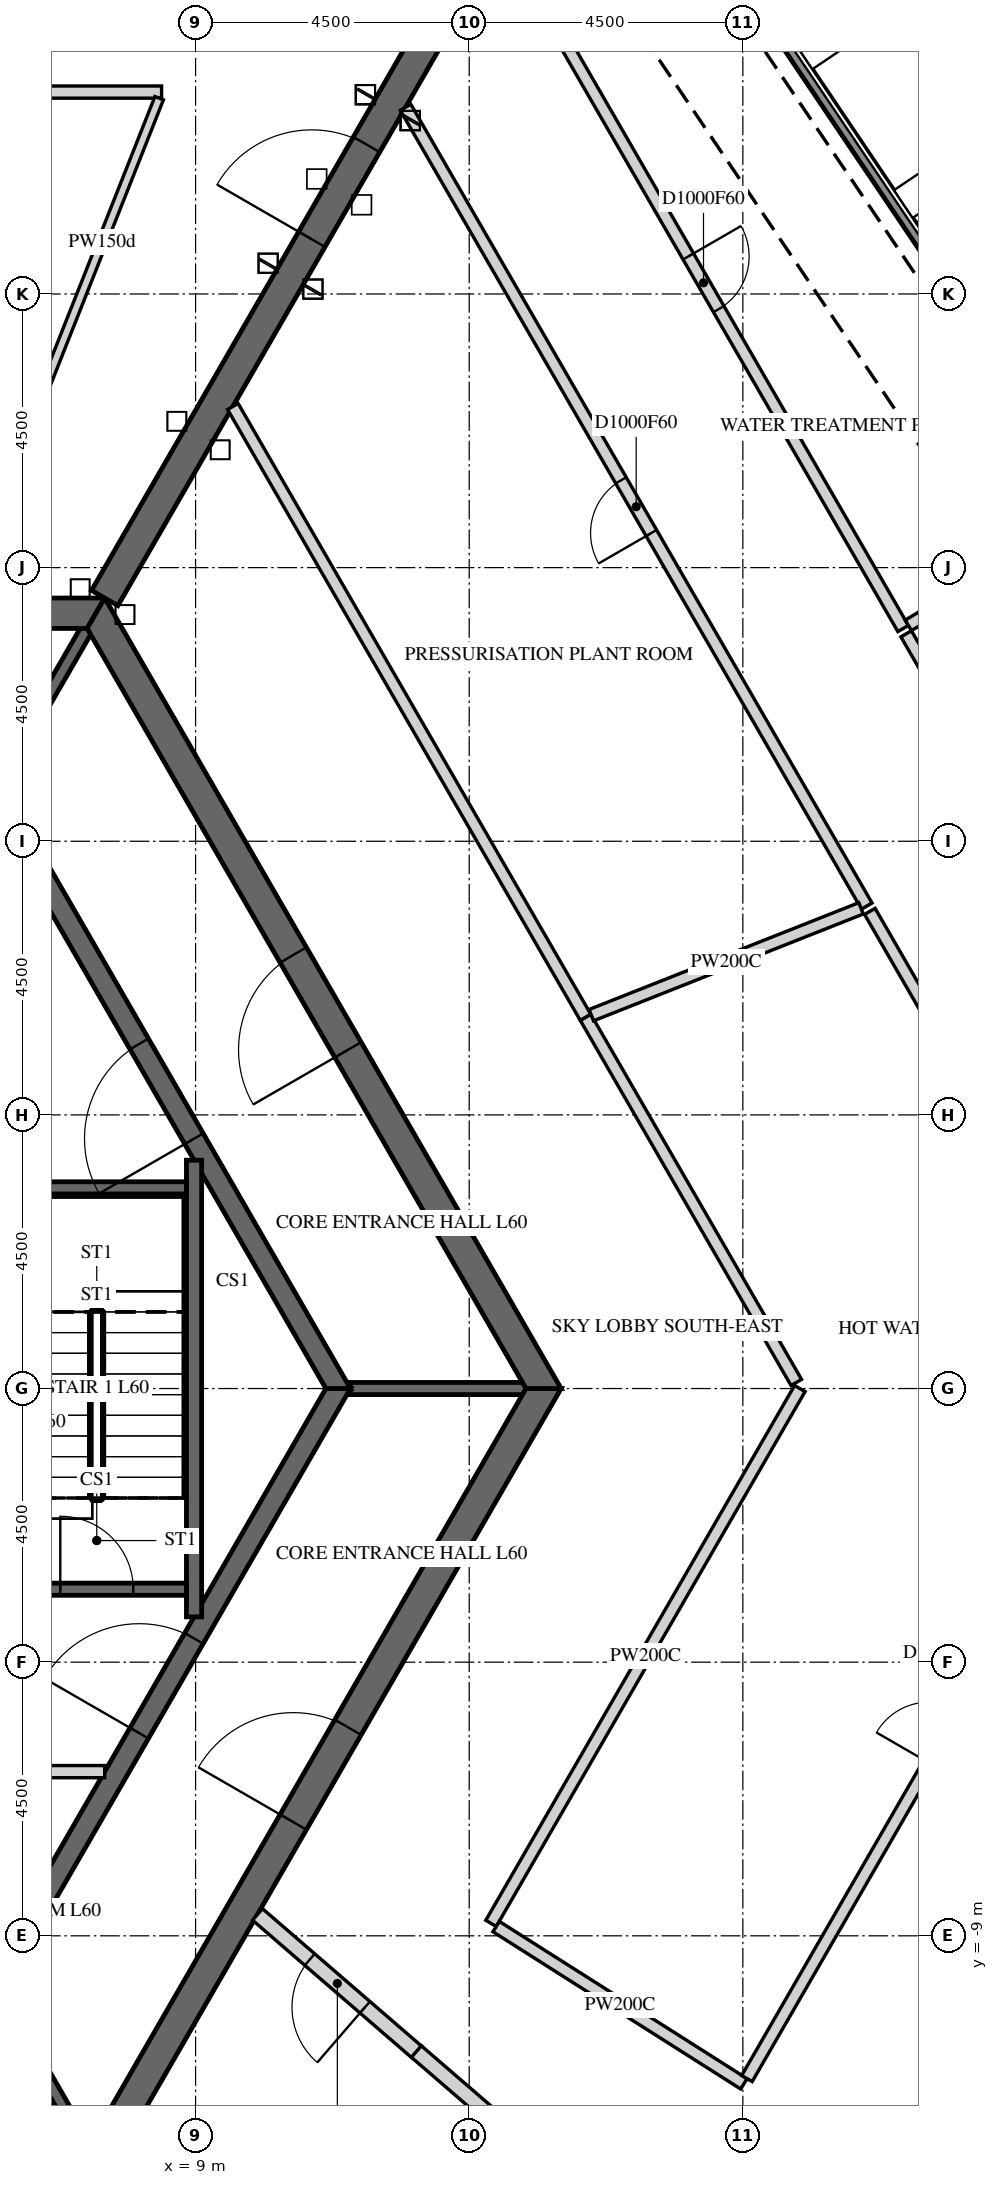
"""IFC4 building model, lengths in metres.
Left out: names, types, materials, properties, quantities, classifications, styles, units other than length and angle.
Written with IfcOpenShell. Run it as: python <this file> out.ifc"""

import sys

from ifc_helpers import new_model, si_unit, direction, frame, frame_2d, origin, place, context, subcontext, project, spatial, polyline, rectangle, outline, extrude, element, fill, save


model = new_model("IFC4")
c1 = context("Model", 3, precision=1e-05, world=origin(), true_north=direction((0.0, 1.0)))
c2 = subcontext(c1, "Body", "Model", "MODEL_VIEW")
j1 = project(units=[si_unit("LENGTHUNIT", "METRE"), si_unit("PLANEANGLEUNIT", "RADIAN")], contexts=[c1])
p1 = place(None, origin())
s1 = spatial("IfcSite", under=j1, at=p1, CompositionType="ELEMENT")
p2 = place(p1, origin())
s2 = spatial("IfcBuilding", under=s1, at=p2, CompositionType="ELEMENT")
p3 = place(p2, frame((0.0, 0.0, 250.2)))
s3 = spatial("IfcBuildingStorey", under=s2, at=p3, CompositionType="ELEMENT", Elevation=250.2)
p4 = place(p3, frame((15.999, 26.174, 5.7), z_axis=(0.0, 0.0, 1.0), x_axis=(0.559192735444, -0.82903768589, 0.0)))
e1 = element("IfcWall", 1, at=p4, inside=s3, PredefinedType="PARAPET", context=c2, shape_type="SweptSolid", body=[
    extrude(outline(polyline([(0.008, -0.1), (27.731, -0.1), (27.75, 0.1), (-0.008, 0.1), (0.008, -0.1)])), origin(), (0.0, 0.0, 1.0), 1.1),
])
p5 = place(p3, frame((31.656, -0.97, 5.7), z_axis=(0.0, 0.0, 1.0), x_axis=(-0.499997219864, -0.866027008891, 0.0)))
e2 = element("IfcWall", 2, at=p5, inside=s3, PredefinedType="PARAPET", context=c2, shape_type="SweptSolid", body=[
    extrude(outline(polyline([(0.009, -0.1), (27.732, -0.1), (27.749, 0.1), (-0.009, 0.1), (0.009, -0.1)])), origin(), (0.0, 0.0, 1.0), 1.1),
])
p6 = place(p3, frame((7.361, -12.75, -0.3), z_axis=(0.0, 0.0, 1.0), x_axis=(0.50000571537, 0.866022103989, 0.0)))
e3 = element("IfcWall", 3, at=p6, inside=s3, PredefinedType="SHEAR", context=c2, shape_type="SweptSolid", body=[
    extrude(outline(polyline([(-0.144, -0.25), (14.867, -0.25), (14.578, 0.25), (0.144, 0.25), (-0.144, -0.25)])), origin(), (0.0, 0.0, 1.0), 5.8),
])
p7 = place(p6, frame((6.49, 0.0, 0.3)))
e4 = element("IfcOpeningElement", 4, at=p7, cuts=e3, PredefinedType="OPENING", context=c2, shape_type="SweptSolid", body=[
    extrude(rectangle(XDim=1.8, YDim=2.4, at=frame_2d((0.9, 1.2))), frame((0.0, 0.26, 0.0), z_axis=(0.0, -1.0, 0.0), x_axis=(1.0, 0.0, 0.0)), (0.0, 0.0, 1.0), 0.52),
])
p8 = place(p3, frame((14.722, 0.0, -0.3), z_axis=(0.0, 0.0, 1.0), x_axis=(-0.50000571537, 0.866022103989, 0.0)))
e5 = element("IfcWall", 5, at=p8, inside=s3, PredefinedType="SHEAR", context=c2, shape_type="SweptSolid", body=[
    extrude(outline(polyline([(-0.144, -0.25), (14.867, -0.25), (14.578, 0.25), (0.144, 0.25), (-0.144, -0.25)])), origin(), (0.0, 0.0, 1.0), 5.8),
])
p9 = place(p8, frame((6.432, 0.0, 0.3)))
e6 = element("IfcOpeningElement", 6, at=p9, cuts=e5, PredefinedType="OPENING", context=c2, shape_type="SweptSolid", body=[
    extrude(rectangle(XDim=1.8, YDim=2.4, at=frame_2d((0.9, 1.2))), frame((0.0, 0.26, 0.0), z_axis=(0.0, -1.0, 0.0), x_axis=(1.0, 0.0, 0.0)), (0.0, 0.0, 1.0), 0.52),
])
p10 = place(p3, frame((7.361, 12.75, -0.3), z_axis=(0.0, 0.0, 1.0), x_axis=(-1.0, 0.0, 0.0)))
e7 = element("IfcWall", 7, at=p10, inside=s3, PredefinedType="SHEAR", context=c2, shape_type="SweptSolid", body=[
    extrude(outline(polyline([(-0.144, -0.25), (14.866, -0.25), (14.578, 0.25), (0.144, 0.25), (-0.144, -0.25)])), origin(), (0.0, 0.0, 1.0), 5.8),
])
p11 = place(p10, frame((6.761, 0.0, 0.3)))
e8 = element("IfcOpeningElement", 8, at=p11, cuts=e7, PredefinedType="OPENING", context=c2, shape_type="SweptSolid", body=[
    extrude(rectangle(XDim=1.2, YDim=2.4, at=frame_2d((0.6, 1.2))), frame((0.0, 0.26, 0.0), z_axis=(0.0, -1.0, 0.0), x_axis=(1.0, 0.0, 0.0)), (0.0, 0.0, 1.0), 0.52),
])
p12 = place(p3, frame((7.506, 13.0, -0.3), z_axis=(0.0, 0.0, 1.0), x_axis=(0.499988271576, 0.866032175087, 0.0)))
e9 = element("IfcWall", 9, at=p12, inside=s3, PredefinedType="SHEAR", context=c2, shape_type="SweptSolid", body=[
    extrude(rectangle(XDim=15.424, YDim=0.5, at=frame_2d((7.712, 0.0))), origin(), (0.0, 0.0, 1.0), 5.8),
])
p13 = place(p12, frame((6.812, 0.0, 0.3)))
e10 = element("IfcOpeningElement", 10, at=p13, cuts=e9, PredefinedType="OPENING", context=c2, shape_type="SweptSolid", body=[
    extrude(rectangle(XDim=1.8, YDim=2.4, at=frame_2d((0.9, 1.2))), frame((0.0, 0.26, 0.0), z_axis=(0.0, -1.0, 0.0), x_axis=(1.0, 0.0, 0.0)), (0.0, 0.0, 1.0), 0.52),
])
p14 = place(p3, frame((5.673, -9.825, -0.3), z_axis=(0.0, 0.0, 1.0), x_axis=(0.499995046907, 0.866028263435, 0.0)))
e11 = element("IfcWall", 11, at=p14, inside=s3, PredefinedType="SHEAR", context=c2, shape_type="SweptSolid", body=[
    extrude(outline(polyline([(-0.101, -0.175), (11.446, -0.175), (11.244, 0.175), (0.101, 0.175), (-0.101, -0.175)])), origin(), (0.0, 0.0, 1.0), 5.8),
])
p15 = place(p14, frame((4.801, 0.0, 0.3)))
e12 = element("IfcOpeningElement", 12, at=p15, cuts=e11, PredefinedType="OPENING", context=c2, shape_type="SweptSolid", body=[
    extrude(rectangle(XDim=1.8, YDim=2.4, at=frame_2d((0.9, 1.2))), frame((0.0, 0.185, 0.0), z_axis=(0.0, -1.0, 0.0), x_axis=(1.0, 0.0, 0.0)), (0.0, 0.0, 1.0), 0.37),
])
p16 = place(p3, frame((11.345, 0.0, -0.3), z_axis=(0.0, 0.0, 1.0), x_axis=(-0.499995046907, 0.866028263435, 0.0)))
e13 = element("IfcWall", 13, at=p16, inside=s3, PredefinedType="SHEAR", context=c2, shape_type="SweptSolid", body=[
    extrude(outline(polyline([(-0.101, -0.175), (11.446, -0.175), (11.244, 0.175), (0.101, 0.175), (-0.101, -0.175)])), origin(), (0.0, 0.0, 1.0), 5.8),
])
p17 = place(p16, frame((4.744, 0.0, 0.3)))
e14 = element("IfcOpeningElement", 14, at=p17, cuts=e13, PredefinedType="OPENING", context=c2, shape_type="SweptSolid", body=[
    extrude(rectangle(XDim=1.8, YDim=2.4, at=frame_2d((0.9, 1.2))), frame((0.0, 0.185, 0.0), z_axis=(0.0, -1.0, 0.0), x_axis=(1.0, 0.0, 0.0)), (0.0, 0.0, 1.0), 0.37),
])
p18 = place(p3, frame((3.7, -6.3, 0.0), z_axis=(0.0, 0.0, 1.0), x_axis=(1.0, 0.0, 0.0)))
e15 = element("IfcWall", 15, at=p18, inside=s3, PredefinedType="PARTITIONING", context=c2, shape_type="SweptSolid", body=[
    extrude(rectangle(XDim=3.806, YDim=0.2, at=frame_2d((1.903, 0.0))), origin(), (0.0, 0.0, 1.0), 5.5),
])
p19 = place(p18, frame((1.453, 0.0, 0.0)))
e16 = element("IfcOpeningElement", 16, at=p19, cuts=e15, PredefinedType="OPENING", context=c2, shape_type="SweptSolid", body=[
    extrude(rectangle(XDim=0.9, YDim=2.1, at=frame_2d((0.45, 1.05))), frame((0.0, 0.11, 0.0), z_axis=(0.0, -1.0, 0.0), x_axis=(1.0, 0.0, 0.0)), (0.0, 0.0, 1.0), 0.22),
])
for number, where, z_axis, x_axis in (
    (17, (11.547, 0.0, -0.3), (0.0, 0.0, 1.0), (1.0, 0.0, 0.0)),
    (18, (5.773, 10.0, -0.3), (0.0, 0.0, 1.0), (0.5, 0.866, 0.0)),
    (19, (5.773, -10.0, -0.3), (0.0, 0.0, 1.0), (0.5, -0.866, 0.0)),
):
    element("IfcWall", number, at=place(p3, frame(where, z_axis=z_axis, x_axis=x_axis)), inside=s3, PredefinedType="SHEAR", context=c2, shape_type="SweptSolid", body=[
        extrude(rectangle(XDim=2.887, YDim=0.2, at=frame_2d((1.443, 0.0))), origin(), (0.0, 0.0, 1.0), 5.8),
    ])
p20 = place(p3, frame((8.975, -3.755, -0.25), z_axis=(0.0, 0.0, 1.0), x_axis=(0.0, 1.0, 0.0)))
e20 = element("IfcWall", 20, at=p20, inside=s3, PredefinedType="SHEAR", context=c2, shape_type="SweptSolid", body=[
    extrude(rectangle(XDim=7.51, YDim=0.25, at=frame_2d((3.755, 0.0))), origin(), (0.0, 0.0, 1.0), 5.75),
])
p21 = place(p3, frame((5.9, 3.3, -0.25), z_axis=(0.0, 0.0, 1.0), x_axis=(1.0, 0.0, 0.0)))
e21 = element("IfcWall", 21, at=p21, inside=s3, PredefinedType="SHEAR", context=c2, shape_type="SweptSolid", body=[
    extrude(rectangle(XDim=2.95, YDim=0.2, at=frame_2d((1.475, 0.0))), origin(), (0.0, 0.0, 1.0), 5.75),
])
p22 = place(p3, frame((5.9, -3.3, -0.25), z_axis=(0.0, 0.0, 1.0), x_axis=(1.0, 0.0, 0.0)))
e22 = element("IfcWall", 22, at=p22, inside=s3, PredefinedType="SHEAR", context=c2, shape_type="SweptSolid", body=[
    extrude(rectangle(XDim=2.95, YDim=0.2, at=frame_2d((1.475, 0.0))), origin(), (0.0, 0.0, 1.0), 5.75),
])
p23 = place(p22, frame((0.875, 0.0, 0.25)))
e23 = element("IfcOpeningElement", 23, at=p23, cuts=e22, PredefinedType="OPENING", context=c2, shape_type="SweptSolid", body=[
    extrude(rectangle(XDim=1.2, YDim=2.4, at=frame_2d((0.6, 1.2))), frame((0.0, 0.11, 0.0), z_axis=(0.0, -1.0, 0.0), x_axis=(1.0, 0.0, 0.0)), (0.0, 0.0, 1.0), 0.22),
])
p24 = place(p3, frame((8.441, 21.32, 0.0), z_axis=(0.0, 0.0, 1.0), x_axis=(-1.0, 0.0, 0.0)))
e24 = element("IfcWall", 24, at=p24, inside=s3, PredefinedType="PARTITIONING", context=c2, shape_type="SweptSolid", body=[
    extrude(rectangle(XDim=20.635, YDim=0.2, at=frame_2d((10.317, 0.0))), origin(), (0.0, 0.0, 1.0), 5.5),
])
p25 = place(p24, frame((9.417, 0.0, 0.0)))
e25 = element("IfcOpeningElement", 25, at=p25, cuts=e24, PredefinedType="OPENING", context=c2, shape_type="SweptSolid", body=[
    extrude(rectangle(XDim=1.8, YDim=2.1, at=frame_2d((0.9, 1.05))), frame((0.0, 0.11, 0.0), z_axis=(0.0, -1.0, 0.0), x_axis=(1.0, 0.0, 0.0)), (0.0, 0.0, 1.0), 0.22),
])
p26 = place(p3, frame((8.401, 21.22, 0.0), z_axis=(0.0, 0.0, 1.0), x_axis=(-0.368130307477, -0.929774207384, 0.0)))
e26 = element("IfcWall", 26, at=p26, inside=s3, PredefinedType="PARTITIONING", context=c2, shape_type="SweptSolid", body=[
    extrude(rectangle(XDim=5.103, YDim=0.15, at=frame_2d((2.552, 0.0))), origin(), (0.0, 0.0, 1.0), 5.5),
])
p27 = place(p3, frame((12.645, -10.917, 0.0), z_axis=(0.0, 0.0, 1.0), x_axis=(-0.756778725629, 0.653671140892, 0.0)))
e27 = element("IfcWall", 27, at=p27, inside=s3, PredefinedType="PARTITIONING", context=c2, shape_type="SweptSolid", body=[
    extrude(rectangle(XDim=3.471, YDim=0.25, at=frame_2d((1.736, 0.0))), origin(), (0.0, 0.0, 1.0), 4.573),
])
p28 = place(p27, frame((1.135, 0.0, 0.0)))
e28 = element("IfcOpeningElement", 28, at=p28, cuts=e27, PredefinedType="OPENING", context=c2, shape_type="SweptSolid", body=[
    extrude(rectangle(XDim=1.2, YDim=2.1, at=frame_2d((0.6, 1.05))), frame((0.0, 0.135, 0.0), z_axis=(0.0, -1.0, 0.0), x_axis=(1.0, 0.0, 0.0)), (0.0, 0.0, 1.0), 0.27),
])
p29 = place(p3, frame((20.038, 7.934, 0.0), z_axis=(0.0, 0.0, 1.0), x_axis=(-0.500056356876, 0.865992863682, 0.0)))
e29 = element("IfcWall", 29, at=p29, inside=s3, PredefinedType="PARTITIONING", context=c2, shape_type="SweptSolid", body=[
    extrude(rectangle(XDim=15.169, YDim=0.2, at=frame_2d((7.584, 0.0))), origin(), (0.0, 0.0, 1.0), 5.5),
])
p30 = place(p29, frame((7.084, 0.0, 0.0)))
e30 = element("IfcOpeningElement", 30, at=p30, cuts=e29, PredefinedType="OPENING", context=c2, shape_type="SweptSolid", body=[
    extrude(rectangle(XDim=1.0, YDim=2.1, at=frame_2d((0.5, 1.05))), frame((0.0, 0.11, 0.0), z_axis=(0.0, -1.0, 0.0), x_axis=(1.0, 0.0, 0.0)), (0.0, 0.0, 1.0), 0.22),
])
p31 = place(p3, frame((12.631, -10.903, 0.0), z_axis=(0.0, 0.0, 1.0), x_axis=(0.756924533262, -0.653502296053, 0.0)))
e31 = element("IfcWall", 31, at=p31, inside=s3, PredefinedType="PARTITIONING", context=c2, shape_type="SweptSolid", body=[
    extrude(rectangle(XDim=5.028, YDim=0.25, at=frame_2d((2.514, 0.0))), origin(), (0.0, 0.0, 1.0), 4.573),
])
p32 = place(p3, frame((13.859, -8.795, 0.0), z_axis=(0.0, 0.0, 1.0), x_axis=(0.500027655771, 0.866009436129, 0.0)))
e32 = element("IfcWall", 32, at=p32, inside=s3, PredefinedType="PARTITIONING", context=c2, shape_type="SweptSolid", body=[
    extrude(rectangle(XDim=10.156, YDim=0.2, at=frame_2d((5.078, 0.0))), origin(), (0.0, 0.0, 1.0), 5.5),
])
p33 = place(p3, frame((15.414, 6.103, 0.0), z_axis=(0.0, 0.0, 1.0), x_axis=(-0.50002969912, 0.86600825631, 0.0)))
e33 = element("IfcWall", 33, at=p33, inside=s3, PredefinedType="PARTITIONING", context=c2, shape_type="SweptSolid", body=[
    extrude(rectangle(XDim=11.601, YDim=0.2, at=frame_2d((5.801, 0.0))), origin(), (0.0, 0.0, 1.0), 5.5),
])
p34 = place(p3, frame((18.017, -11.434, 0.0), z_axis=(0.0, 0.0, 1.0), x_axis=(-0.844296399795, 0.535876468315, 0.0)))
e34 = element("IfcWall", 34, at=p34, inside=s3, PredefinedType="PARTITIONING", context=c2, shape_type="SweptSolid", body=[
    extrude(rectangle(XDim=4.825, YDim=0.2, at=frame_2d((2.412, 0.0))), origin(), (0.0, 0.0, 1.0), 5.5),
])
p35 = place(p3, frame((26.564, -2.231, 0.0), z_axis=(0.0, 0.0, 1.0), x_axis=(-0.500020273296, -0.866013698675, 0.0)))
e35 = element("IfcWall", 35, at=p35, inside=s3, PredefinedType="PARTITIONING", context=c2, shape_type="SweptSolid", body=[
    extrude(rectangle(XDim=15.824, YDim=0.2, at=frame_2d((7.912, 0.0))), origin(), (0.0, 0.0, 1.0), 5.5),
])
p36 = place(p35, frame((7.412, 0.0, 0.0)))
e36 = element("IfcOpeningElement", 36, at=p36, cuts=e35, PredefinedType="OPENING", context=c2, shape_type="SweptSolid", body=[
    extrude(rectangle(XDim=1.0, YDim=2.1, at=frame_2d((0.5, 1.05))), frame((0.0, 0.11, 0.0), z_axis=(0.0, -1.0, 0.0), x_axis=(1.0, 0.0, 0.0)), (0.0, 0.0, 1.0), 0.22),
])
p37 = place(p3, frame((18.879, 0.1, 0.0), z_axis=(0.0, 0.0, 1.0), x_axis=(-0.499923693419, 0.866069454927, 0.0)))
e37 = element("IfcWall", 37, at=p37, inside=s3, PredefinedType="PARTITIONING", context=c2, shape_type="SweptSolid", body=[
    extrude(rectangle(XDim=6.931, YDim=0.2, at=frame_2d((3.466, 0.0))), origin(), (0.0, 0.0, 1.0), 5.5),
])
p38 = place(p3, frame((19.944, 7.897, 0.0), z_axis=(0.0, 0.0, 1.0), x_axis=(-0.929759179484, -0.368168260671, 0.0)))
e38 = element("IfcWall", 38, at=p38, inside=s3, PredefinedType="PARTITIONING", context=c2, shape_type="SweptSolid", body=[
    extrude(rectangle(XDim=4.771, YDim=0.2, at=frame_2d((2.386, 0.0))), origin(), (0.0, 0.0, 1.0), 5.5),
])
p39 = place(p3, frame((20.089, 7.846, 0.0), z_axis=(0.0, 0.0, 1.0), x_axis=(0.499930063508, -0.866065777872, 0.0)))
e39 = element("IfcWall", 39, at=p39, inside=s3, PredefinedType="PARTITIONING", context=c2, shape_type="SweptSolid", body=[
    extrude(rectangle(XDim=9.06, YDim=0.2, at=frame_2d((4.53, 0.0))), origin(), (0.0, 0.0, 1.0), 5.5),
])
p40 = place(p3, frame((14.07, 23.87, 0.0), z_axis=(0.0, 0.0, 1.0), x_axis=(0.500014285048, -0.866017156151, 0.0)))
e40 = element("IfcWall", 40, at=p40, inside=s3, PredefinedType="PARTITIONING", context=c2, shape_type="SweptSolid", body=[
    extrude(rectangle(XDim=13.131, YDim=0.2, at=frame_2d((6.566, 0.0))), origin(), (0.0, 0.0, 1.0), 5.5),
])
p41 = place(p40, frame((6.066, 0.0, 0.0)))
e41 = element("IfcOpeningElement", 41, at=p41, cuts=e40, PredefinedType="OPENING", context=c2, shape_type="SweptSolid", body=[
    extrude(rectangle(XDim=1.0, YDim=2.1, at=frame_2d((0.5, 1.05))), frame((0.0, 0.11, 0.0), z_axis=(0.0, -1.0, 0.0), x_axis=(1.0, 0.0, 0.0)), (0.0, 0.0, 1.0), 0.22),
])
p42 = place(p3, frame((23.679, 14.341, 0.0), z_axis=(0.0, 0.0, 1.0), x_axis=(-0.855411164344, -0.517949553447, 0.0)))
e42 = element("IfcWall", 42, at=p42, inside=s3, PredefinedType="PARTITIONING", context=c2, shape_type="SweptSolid", body=[
    extrude(rectangle(XDim=3.458, YDim=0.2, at=frame_2d((1.729, 0.0))), origin(), (0.0, 0.0, 1.0), 4.573),
])
p43 = place(p3, frame((18.067, -11.347, 0.0), z_axis=(0.0, 0.0, 1.0), x_axis=(0.49997251285, 0.866041272916, 0.0)))
e43 = element("IfcWall", 43, at=p43, inside=s3, PredefinedType="PARTITIONING", context=c2, shape_type="SweptSolid", body=[
    extrude(rectangle(XDim=12.987, YDim=0.2, at=frame_2d((6.494, 0.0))), origin(), (0.0, 0.0, 1.0), 5.5),
])
p44 = place(p43, frame((5.994, 0.0, 0.0)))
e44 = element("IfcOpeningElement", 44, at=p44, cuts=e43, PredefinedType="OPENING", context=c2, shape_type="SweptSolid", body=[
    extrude(rectangle(XDim=1.0, YDim=2.1, at=frame_2d((0.5, 1.05))), frame((0.0, 0.11, 0.0), z_axis=(0.0, -1.0, 0.0), x_axis=(1.0, 0.0, 0.0)), (0.0, 0.0, 1.0), 0.22),
])
p45 = place(p3, frame((20.686, 12.411, 0.0), z_axis=(0.0, 0.0, 1.0), x_axis=(0.499960816026, -0.86604802548, 0.0)))
e45 = element("IfcWall", 45, at=p45, inside=s3, PredefinedType="PARTITIONING", context=c2, shape_type="SweptSolid", body=[
    extrude(rectangle(XDim=14.216, YDim=0.2, at=frame_2d((7.108, 0.0))), origin(), (0.0, 0.0, 1.0), 5.5),
])
p46 = place(p45, frame((6.608, 0.0, 0.0)))
e46 = element("IfcOpeningElement", 46, at=p46, cuts=e45, PredefinedType="OPENING", context=c2, shape_type="SweptSolid", body=[
    extrude(rectangle(XDim=1.0, YDim=2.1, at=frame_2d((0.5, 1.05))), frame((0.0, 0.11, 0.0), z_axis=(0.0, -1.0, 0.0), x_axis=(1.0, 0.0, 0.0)), (0.0, 0.0, 1.0), 0.22),
])
p47 = place(p9, origin())
e47 = element("IfcDoor", 47, at=p47, inside=s3, OperationType="DOUBLE_DOOR_SINGLE_SWING", PredefinedType="DOOR", context=c2, shape_type="SweptSolid", body=[
    extrude(rectangle(XDim=1.8, YDim=2.4, at=frame_2d((0.9, 1.2))), frame((0.0, 0.025, 0.0), z_axis=(0.0, -1.0, 0.0), x_axis=(1.0, 0.0, 0.0)), (0.0, 0.0, 1.0), 0.05),
])
fill(e6, e47)
p48 = place(p7, origin())
e48 = element("IfcDoor", 48, at=p48, inside=s3, OperationType="DOUBLE_DOOR_SINGLE_SWING", PredefinedType="DOOR", context=c2, shape_type="SweptSolid", body=[
    extrude(rectangle(XDim=1.8, YDim=2.4, at=frame_2d((0.9, 1.2))), frame((0.0, 0.025, 0.0), z_axis=(0.0, -1.0, 0.0), x_axis=(1.0, 0.0, 0.0)), (0.0, 0.0, 1.0), 0.05),
])
fill(e4, e48)
p49 = place(p13, origin())
e49 = element("IfcDoor", 49, at=p49, inside=s3, OperationType="DOUBLE_DOOR_SINGLE_SWING", PredefinedType="DOOR", context=c2, shape_type="SweptSolid", body=[
    extrude(rectangle(XDim=1.8, YDim=2.4, at=frame_2d((0.9, 1.2))), frame((0.0, 0.025, 0.0), z_axis=(0.0, -1.0, 0.0), x_axis=(1.0, 0.0, 0.0)), (0.0, 0.0, 1.0), 0.05),
])
fill(e10, e49)
p50 = place(p17, origin())
e50 = element("IfcDoor", 50, at=p50, inside=s3, OperationType="DOUBLE_DOOR_SINGLE_SWING", PredefinedType="DOOR", context=c2, shape_type="SweptSolid", body=[
    extrude(rectangle(XDim=1.8, YDim=2.4, at=frame_2d((0.9, 1.2))), frame((0.0, 0.025, 0.0), z_axis=(0.0, -1.0, 0.0), x_axis=(1.0, 0.0, 0.0)), (0.0, 0.0, 1.0), 0.05),
])
fill(e14, e50)
p51 = place(p15, origin())
e51 = element("IfcDoor", 51, at=p51, inside=s3, OperationType="DOUBLE_DOOR_SINGLE_SWING", PredefinedType="DOOR", context=c2, shape_type="SweptSolid", body=[
    extrude(rectangle(XDim=1.8, YDim=2.4, at=frame_2d((0.9, 1.2))), frame((0.0, 0.025, 0.0), z_axis=(0.0, -1.0, 0.0), x_axis=(1.0, 0.0, 0.0)), (0.0, 0.0, 1.0), 0.05),
])
fill(e12, e51)
p52 = place(p23, origin())
e52 = element("IfcDoor", 52, at=p52, inside=s3, OperationType="SINGLE_SWING_LEFT", PredefinedType="DOOR", context=c2, shape_type="SweptSolid", body=[
    extrude(rectangle(XDim=1.2, YDim=2.4, at=frame_2d((0.6, 1.2))), frame((0.0, 0.025, 0.0), z_axis=(0.0, -1.0, 0.0), x_axis=(1.0, 0.0, 0.0)), (0.0, 0.0, 1.0), 0.05),
])
fill(e23, e52)
p53 = place(p28, origin())
e53 = element("IfcDoor", 53, at=p53, inside=s3, OperationType="SINGLE_SWING_LEFT", PredefinedType="DOOR", context=c2, shape_type="SweptSolid", body=[
    extrude(rectangle(XDim=1.2, YDim=2.1, at=frame_2d((0.6, 1.05))), frame((0.0, 0.025, 0.0), z_axis=(0.0, -1.0, 0.0), x_axis=(1.0, 0.0, 0.0)), (0.0, 0.0, 1.0), 0.05),
])
fill(e28, e53)
p54 = place(p30, origin())
e54 = element("IfcDoor", 54, at=p54, inside=s3, OperationType="SINGLE_SWING_LEFT", PredefinedType="DOOR", context=c2, shape_type="SweptSolid", body=[
    extrude(rectangle(XDim=1.0, YDim=2.1, at=frame_2d((0.5, 1.05))), frame((0.0, 0.025, 0.0), z_axis=(0.0, -1.0, 0.0), x_axis=(1.0, 0.0, 0.0)), (0.0, 0.0, 1.0), 0.05),
])
fill(e30, e54)
p55 = place(p41, origin())
e55 = element("IfcDoor", 55, at=p55, inside=s3, OperationType="SINGLE_SWING_RIGHT", PredefinedType="DOOR", context=c2, shape_type="SweptSolid", body=[
    extrude(rectangle(XDim=1.0, YDim=2.1, at=frame_2d((0.5, 1.05))), frame((0.0, 0.025, 0.0), z_axis=(0.0, -1.0, 0.0), x_axis=(1.0, 0.0, 0.0)), (0.0, 0.0, 1.0), 0.05),
])
fill(e41, e55)
save(model, sys.argv[1])
